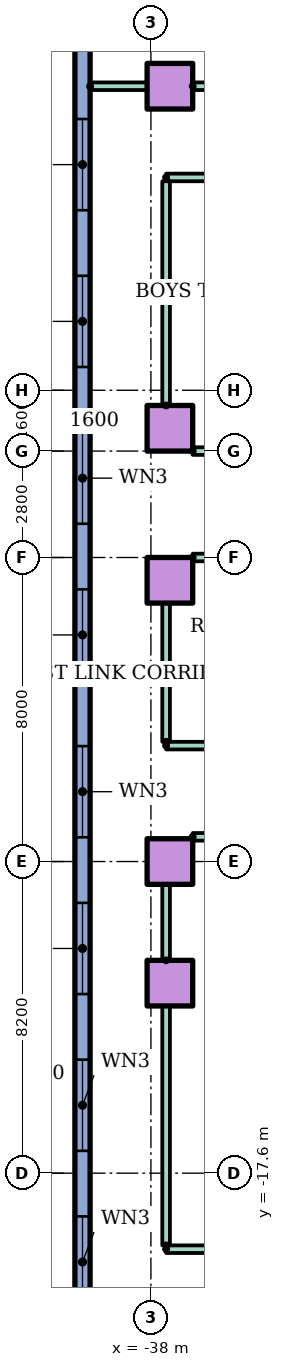
"""IFC4 building model, lengths in metres.
Left out: names, types, materials, properties, quantities, classifications, styles, units other than length and angle.
Written with IfcOpenShell. Run it as: python <this file> out.ifc"""

import sys

from ifc_helpers import new_model, si_unit, direction, frame, frame_2d, origin, origin_2d, place, context, subcontext, project, spatial, rectangle, hollow_rectangle, extrude, element, fill, save


model = new_model("IFC4")
c1 = context("Model", 3, precision=1e-05, world=origin(), true_north=direction((0.0, 1.0)))
c2 = subcontext(c1, "Body", "Model", "MODEL_VIEW")
j1 = project(units=[si_unit("LENGTHUNIT", "METRE"), si_unit("PLANEANGLEUNIT", "RADIAN")], contexts=[c1])
p1 = place(None, origin())
s1 = spatial("IfcSite", under=j1, at=p1, CompositionType="ELEMENT")
p2 = place(p1, origin())
s2 = spatial("IfcBuilding", under=s1, at=p2, CompositionType="ELEMENT")
p3 = place(p2, frame((0.0, 0.0, 10.0)))
s3 = spatial("IfcBuildingStorey", under=s2, at=p3, CompositionType="ELEMENT", Elevation=10.0)
for number, where in (
    (1, (-37.5, -12.6, 0.0)),
    (2, (-37.5, -9.4, 0.0)),
    (3, (-37.5, -2.0, 0.0)),
    (4, (-37.5, 2.0, 0.0)),
    (5, (-37.5, 11.0, 0.0)),
):
    element("IfcColumn", number, at=place(p3, frame(where)), inside=s3, PredefinedType="COLUMN", context=c2, shape_type="SweptSolid", body=[
        extrude(hollow_rectangle(XDim=1.2, YDim=1.2, WallThickness=0.06, at=origin_2d()), origin(), (0.0, 0.0, 1.0), 4.0),
    ])
p4 = place(p3, frame((-39.8, 20.0, 0.0), z_axis=(0.0, 0.0, 1.0), x_axis=(0.0, -1.0, 0.0)))
e6 = element("IfcWall", 6, at=p4, inside=s3, PredefinedType="STANDARD", context=c2, shape_type="SweptSolid", body=[
    extrude(rectangle(XDim=70.0, YDim=0.4, at=frame_2d((35.0, 0.0))), origin(), (0.0, 0.0, 1.0), 3.7),
])
p5 = place(p4, frame((1.05, 0.0, 0.9)))
e7 = element("IfcOpeningElement", 7, at=p5, cuts=e6, PredefinedType="OPENING", context=c2, shape_type="SweptSolid", body=[
    extrude(rectangle(XDim=2.4, YDim=2.1, at=frame_2d((1.2, 1.05))), frame((0.0, 0.21, 0.0), z_axis=(0.0, -1.0, 0.0), x_axis=(1.0, 0.0, 0.0)), (0.0, 0.0, 1.0), 0.42),
])
p6 = place(p4, frame((5.55, 0.0, 0.9)))
e8 = element("IfcOpeningElement", 8, at=p6, cuts=e6, PredefinedType="OPENING", context=c2, shape_type="SweptSolid", body=[
    extrude(rectangle(XDim=2.4, YDim=2.1, at=frame_2d((1.2, 1.05))), frame((0.0, 0.21, 0.0), z_axis=(0.0, -1.0, 0.0), x_axis=(1.0, 0.0, 0.0)), (0.0, 0.0, 1.0), 0.42),
])
p7 = place(p4, frame((9.863, 0.0, 0.9)))
e9 = element("IfcOpeningElement", 9, at=p7, cuts=e6, PredefinedType="OPENING", context=c2, shape_type="SweptSolid", body=[
    extrude(rectangle(XDim=2.4, YDim=2.1, at=frame_2d((1.2, 1.05))), frame((0.0, 0.21, 0.0), z_axis=(0.0, -1.0, 0.0), x_axis=(1.0, 0.0, 0.0)), (0.0, 0.0, 1.0), 0.42),
])
p8 = place(p4, frame((13.988, 0.0, 0.9)))
e10 = element("IfcOpeningElement", 10, at=p8, cuts=e6, PredefinedType="OPENING", context=c2, shape_type="SweptSolid", body=[
    extrude(rectangle(XDim=2.4, YDim=2.1, at=frame_2d((1.2, 1.05))), frame((0.0, 0.21, 0.0), z_axis=(0.0, -1.0, 0.0), x_axis=(1.0, 0.0, 0.0)), (0.0, 0.0, 1.0), 0.42),
])
p9 = place(p4, frame((18.113, 0.0, 0.9)))
e11 = element("IfcOpeningElement", 11, at=p9, cuts=e6, PredefinedType="OPENING", context=c2, shape_type="SweptSolid", body=[
    extrude(rectangle(XDim=2.4, YDim=2.1, at=frame_2d((1.2, 1.05))), frame((0.0, 0.21, 0.0), z_axis=(0.0, -1.0, 0.0), x_axis=(1.0, 0.0, 0.0)), (0.0, 0.0, 1.0), 0.42),
])
p10 = place(p4, frame((22.238, 0.0, 0.9)))
e12 = element("IfcOpeningElement", 12, at=p10, cuts=e6, PredefinedType="OPENING", context=c2, shape_type="SweptSolid", body=[
    extrude(rectangle(XDim=2.4, YDim=2.1, at=frame_2d((1.2, 1.05))), frame((0.0, 0.21, 0.0), z_axis=(0.0, -1.0, 0.0), x_axis=(1.0, 0.0, 0.0)), (0.0, 0.0, 1.0), 0.42),
])
p11 = place(p4, frame((26.363, 0.0, 0.9)))
e13 = element("IfcOpeningElement", 13, at=p11, cuts=e6, PredefinedType="OPENING", context=c2, shape_type="SweptSolid", body=[
    extrude(rectangle(XDim=2.4, YDim=2.1, at=frame_2d((1.2, 1.05))), frame((0.0, 0.21, 0.0), z_axis=(0.0, -1.0, 0.0), x_axis=(1.0, 0.0, 0.0)), (0.0, 0.0, 1.0), 0.42),
])
p12 = place(p4, frame((30.488, 0.0, 0.9)))
e14 = element("IfcOpeningElement", 14, at=p12, cuts=e6, PredefinedType="OPENING", context=c2, shape_type="SweptSolid", body=[
    extrude(rectangle(XDim=2.4, YDim=2.1, at=frame_2d((1.2, 1.05))), frame((0.0, 0.21, 0.0), z_axis=(0.0, -1.0, 0.0), x_axis=(1.0, 0.0, 0.0)), (0.0, 0.0, 1.0), 0.42),
])
p13 = place(p4, frame((34.613, 0.0, 0.9)))
e15 = element("IfcOpeningElement", 15, at=p13, cuts=e6, PredefinedType="OPENING", context=c2, shape_type="SweptSolid", body=[
    extrude(rectangle(XDim=2.4, YDim=2.1, at=frame_2d((1.2, 1.05))), frame((0.0, 0.21, 0.0), z_axis=(0.0, -1.0, 0.0), x_axis=(1.0, 0.0, 0.0)), (0.0, 0.0, 1.0), 0.42),
])
p14 = place(p4, frame((38.738, 0.0, 0.9)))
e16 = element("IfcOpeningElement", 16, at=p14, cuts=e6, PredefinedType="OPENING", context=c2, shape_type="SweptSolid", body=[
    extrude(rectangle(XDim=2.4, YDim=2.1, at=frame_2d((1.2, 1.05))), frame((0.0, 0.21, 0.0), z_axis=(0.0, -1.0, 0.0), x_axis=(1.0, 0.0, 0.0)), (0.0, 0.0, 1.0), 0.42),
])
p15 = place(p4, frame((42.633, 0.0, 0.9)))
e17 = element("IfcOpeningElement", 17, at=p15, cuts=e6, PredefinedType="OPENING", context=c2, shape_type="SweptSolid", body=[
    extrude(rectangle(XDim=2.4, YDim=2.1, at=frame_2d((1.2, 1.05))), frame((0.0, 0.21, 0.0), z_axis=(0.0, -1.0, 0.0), x_axis=(1.0, 0.0, 0.0)), (0.0, 0.0, 1.0), 0.42),
])
p16 = place(p4, frame((46.3, 0.0, 0.9)))
e18 = element("IfcOpeningElement", 18, at=p16, cuts=e6, PredefinedType="OPENING", context=c2, shape_type="SweptSolid", body=[
    extrude(rectangle(XDim=2.4, YDim=2.1, at=frame_2d((1.2, 1.05))), frame((0.0, 0.21, 0.0), z_axis=(0.0, -1.0, 0.0), x_axis=(1.0, 0.0, 0.0)), (0.0, 0.0, 1.0), 0.42),
])
p17 = place(p4, frame((49.967, 0.0, 0.9)))
e19 = element("IfcOpeningElement", 19, at=p17, cuts=e6, PredefinedType="OPENING", context=c2, shape_type="SweptSolid", body=[
    extrude(rectangle(XDim=2.4, YDim=2.1, at=frame_2d((1.2, 1.05))), frame((0.0, 0.21, 0.0), z_axis=(0.0, -1.0, 0.0), x_axis=(1.0, 0.0, 0.0)), (0.0, 0.0, 1.0), 0.42),
])
p18 = place(p4, frame((66.85, 0.0, 0.9)))
e20 = element("IfcOpeningElement", 20, at=p18, cuts=e6, PredefinedType="OPENING", context=c2, shape_type="SweptSolid", body=[
    extrude(rectangle(XDim=2.4, YDim=2.1, at=frame_2d((1.2, 1.05))), frame((0.0, 0.21, 0.0), z_axis=(0.0, -1.0, 0.0), x_axis=(1.0, 0.0, 0.0)), (0.0, 0.0, 1.0), 0.42),
])
p19 = place(p3, frame((-37.6, -19.6, 0.0)))
e21 = element("IfcWall", 21, at=p19, inside=s3, PredefinedType="PARTITIONING", context=c2, shape_type="SweptSolid", body=[
    extrude(rectangle(XDim=75.2, YDim=0.2, at=frame_2d((37.6, 0.0))), origin(), (0.0, 0.0, 1.0), 3.7),
])
p20 = place(p19, frame((2.97, 0.0, 0.0)))
e22 = element("IfcOpeningElement", 22, at=p20, cuts=e21, PredefinedType="OPENING", context=c2, shape_type="SweptSolid", body=[
    extrude(rectangle(XDim=1.1, YDim=2.1, at=frame_2d((0.55, 1.05))), frame((0.0, 0.11, 0.0), z_axis=(0.0, -1.0, 0.0), x_axis=(1.0, 0.0, 0.0)), (0.0, 0.0, 1.0), 0.22),
])
p21 = place(p19, frame((11.93, 0.0, 0.0)))
e23 = element("IfcOpeningElement", 23, at=p21, cuts=e21, PredefinedType="OPENING", context=c2, shape_type="SweptSolid", body=[
    extrude(rectangle(XDim=1.1, YDim=2.1, at=frame_2d((0.55, 1.05))), frame((0.0, 0.11, 0.0), z_axis=(0.0, -1.0, 0.0), x_axis=(1.0, 0.0, 0.0)), (0.0, 0.0, 1.0), 0.22),
])
p22 = place(p19, frame((21.5, 0.0, 0.0)))
e24 = element("IfcOpeningElement", 24, at=p22, cuts=e21, PredefinedType="OPENING", context=c2, shape_type="SweptSolid", body=[
    extrude(rectangle(XDim=1.0, YDim=2.1, at=frame_2d((0.5, 1.05))), frame((0.0, 0.11, 0.0), z_axis=(0.0, -1.0, 0.0), x_axis=(1.0, 0.0, 0.0)), (0.0, 0.0, 1.0), 0.22),
])
p23 = place(p19, frame((32.5, 0.0, 0.0)))
e25 = element("IfcOpeningElement", 25, at=p23, cuts=e21, PredefinedType="OPENING", context=c2, shape_type="SweptSolid", body=[
    extrude(rectangle(XDim=1.0, YDim=2.1, at=frame_2d((0.5, 1.05))), frame((0.0, 0.11, 0.0), z_axis=(0.0, -1.0, 0.0), x_axis=(1.0, 0.0, 0.0)), (0.0, 0.0, 1.0), 0.22),
])
p24 = place(p19, frame((41.5, 0.0, 0.0)))
e26 = element("IfcOpeningElement", 26, at=p24, cuts=e21, PredefinedType="OPENING", context=c2, shape_type="SweptSolid", body=[
    extrude(rectangle(XDim=1.0, YDim=2.1, at=frame_2d((0.5, 1.05))), frame((0.0, 0.11, 0.0), z_axis=(0.0, -1.0, 0.0), x_axis=(1.0, 0.0, 0.0)), (0.0, 0.0, 1.0), 0.22),
])
p25 = place(p19, frame((50.5, 0.0, 0.0)))
e27 = element("IfcOpeningElement", 27, at=p25, cuts=e21, PredefinedType="OPENING", context=c2, shape_type="SweptSolid", body=[
    extrude(rectangle(XDim=1.0, YDim=2.1, at=frame_2d((0.5, 1.05))), frame((0.0, 0.11, 0.0), z_axis=(0.0, -1.0, 0.0), x_axis=(1.0, 0.0, 0.0)), (0.0, 0.0, 1.0), 0.22),
])
p26 = place(p19, frame((59.724, 0.0, 0.0)))
e28 = element("IfcOpeningElement", 28, at=p26, cuts=e21, PredefinedType="OPENING", context=c2, shape_type="SweptSolid", body=[
    extrude(rectangle(XDim=1.0, YDim=2.1, at=frame_2d((0.5, 1.05))), frame((0.0, 0.11, 0.0), z_axis=(0.0, -1.0, 0.0), x_axis=(1.0, 0.0, 0.0)), (0.0, 0.0, 1.0), 0.22),
])
p27 = place(p19, frame((70.476, 0.0, 0.0)))
e29 = element("IfcOpeningElement", 29, at=p27, cuts=e21, PredefinedType="OPENING", context=c2, shape_type="SweptSolid", body=[
    extrude(rectangle(XDim=1.0, YDim=2.1, at=frame_2d((0.5, 1.05))), frame((0.0, 0.11, 0.0), z_axis=(0.0, -1.0, 0.0), x_axis=(1.0, 0.0, 0.0)), (0.0, 0.0, 1.0), 0.22),
])
p28 = place(p3, frame((-36.9, -8.75, 0.0)))
e30 = element("IfcWall", 30, at=p28, inside=s3, PredefinedType="PARTITIONING", context=c2, shape_type="SweptSolid", body=[
    extrude(rectangle(XDim=73.8, YDim=0.2, at=frame_2d((36.9, 0.0))), origin(), (0.0, 0.0, 1.0), 3.7),
])
p29 = place(p3, frame((-37.6, -6.35, 0.0)))
e31 = element("IfcWall", 31, at=p29, inside=s3, PredefinedType="PARTITIONING", context=c2, shape_type="SweptSolid", body=[
    extrude(rectangle(XDim=75.2, YDim=0.2, at=frame_2d((37.6, 0.0))), origin(), (0.0, 0.0, 1.0), 3.7),
])
p30 = place(p29, frame((6.5, 0.0, 0.0)))
e32 = element("IfcOpeningElement", 32, at=p30, cuts=e31, PredefinedType="OPENING", context=c2, shape_type="SweptSolid", body=[
    extrude(rectangle(XDim=1.0, YDim=2.1, at=frame_2d((0.5, 1.05))), frame((0.0, 0.11, 0.0), z_axis=(0.0, -1.0, 0.0), x_axis=(1.0, 0.0, 0.0)), (0.0, 0.0, 1.0), 0.22),
])
p31 = place(p29, frame((18.55, 0.0, 0.0)))
e33 = element("IfcOpeningElement", 33, at=p31, cuts=e31, PredefinedType="OPENING", context=c2, shape_type="SweptSolid", body=[
    extrude(rectangle(XDim=0.9, YDim=2.1, at=frame_2d((0.45, 1.05))), frame((0.0, 0.11, 0.0), z_axis=(0.0, -1.0, 0.0), x_axis=(1.0, 0.0, 0.0)), (0.0, 0.0, 1.0), 0.22),
])
p32 = place(p29, frame((27.55, 0.0, 0.0)))
e34 = element("IfcOpeningElement", 34, at=p32, cuts=e31, PredefinedType="OPENING", context=c2, shape_type="SweptSolid", body=[
    extrude(rectangle(XDim=0.9, YDim=2.1, at=frame_2d((0.45, 1.05))), frame((0.0, 0.11, 0.0), z_axis=(0.0, -1.0, 0.0), x_axis=(1.0, 0.0, 0.0)), (0.0, 0.0, 1.0), 0.22),
])
p33 = place(p29, frame((36.55, 0.0, 0.0)))
e35 = element("IfcOpeningElement", 35, at=p33, cuts=e31, PredefinedType="OPENING", context=c2, shape_type="SweptSolid", body=[
    extrude(rectangle(XDim=0.9, YDim=2.1, at=frame_2d((0.45, 1.05))), frame((0.0, 0.11, 0.0), z_axis=(0.0, -1.0, 0.0), x_axis=(1.0, 0.0, 0.0)), (0.0, 0.0, 1.0), 0.22),
])
p34 = place(p29, frame((48.5, 0.0, 0.0)))
e36 = element("IfcOpeningElement", 36, at=p34, cuts=e31, PredefinedType="OPENING", context=c2, shape_type="SweptSolid", body=[
    extrude(rectangle(XDim=1.0, YDim=2.1, at=frame_2d((0.5, 1.05))), frame((0.0, 0.11, 0.0), z_axis=(0.0, -1.0, 0.0), x_axis=(1.0, 0.0, 0.0)), (0.0, 0.0, 1.0), 0.22),
])
p35 = place(p29, frame((65.15, 0.0, 0.0)))
e37 = element("IfcOpeningElement", 37, at=p35, cuts=e31, PredefinedType="OPENING", context=c2, shape_type="SweptSolid", body=[
    extrude(rectangle(XDim=0.9, YDim=2.1, at=frame_2d((0.45, 1.05))), frame((0.0, 0.11, 0.0), z_axis=(0.0, -1.0, 0.0), x_axis=(1.0, 0.0, 0.0)), (0.0, 0.0, 1.0), 0.22),
])
p36 = place(p3, frame((-36.9, -1.4, 0.0)))
e38 = element("IfcWall", 38, at=p36, inside=s3, PredefinedType="PARTITIONING", context=c2, shape_type="SweptSolid", body=[
    extrude(rectangle(XDim=22.9, YDim=0.2, at=frame_2d((11.45, 0.0))), origin(), (0.0, 0.0, 1.0), 3.7),
])
p37 = place(p3, frame((-36.9, 1.4, 0.0)))
e39 = element("IfcWall", 39, at=p37, inside=s3, PredefinedType="PARTITIONING", context=c2, shape_type="SweptSolid", body=[
    extrude(rectangle(XDim=20.6, YDim=0.2, at=frame_2d((10.3, 0.0))), origin(), (0.0, 0.0, 1.0), 3.7),
])
p38 = place(p37, frame((1.3, 0.0, 0.0)))
e40 = element("IfcOpeningElement", 40, at=p38, cuts=e39, PredefinedType="OPENING", context=c2, shape_type="SweptSolid", body=[
    extrude(rectangle(XDim=1.0, YDim=2.1, at=frame_2d((0.5, 1.05))), frame((0.0, 0.11, 0.0), z_axis=(0.0, -1.0, 0.0), x_axis=(1.0, 0.0, 0.0)), (0.0, 0.0, 1.0), 0.22),
])
p39 = place(p37, frame((5.25, 0.0, 0.0)))
e41 = element("IfcOpeningElement", 41, at=p39, cuts=e39, PredefinedType="OPENING", context=c2, shape_type="SweptSolid", body=[
    extrude(rectangle(XDim=1.0, YDim=2.1, at=frame_2d((0.5, 1.05))), frame((0.0, 0.11, 0.0), z_axis=(0.0, -1.0, 0.0), x_axis=(1.0, 0.0, 0.0)), (0.0, 0.0, 1.0), 0.22),
])
p40 = place(p37, frame((10.0, 0.0, 0.0)))
e42 = element("IfcOpeningElement", 42, at=p40, cuts=e39, PredefinedType="OPENING", context=c2, shape_type="SweptSolid", body=[
    extrude(rectangle(XDim=1.0, YDim=2.1, at=frame_2d((0.5, 1.05))), frame((0.0, 0.11, 0.0), z_axis=(0.0, -1.0, 0.0), x_axis=(1.0, 0.0, 0.0)), (0.0, 0.0, 1.0), 0.22),
])
p41 = place(p37, frame((12.35, 0.0, 0.0)))
e43 = element("IfcOpeningElement", 43, at=p41, cuts=e39, PredefinedType="OPENING", context=c2, shape_type="SweptSolid", body=[
    extrude(rectangle(XDim=0.9, YDim=2.1, at=frame_2d((0.45, 1.05))), frame((0.0, 0.11, 0.0), z_axis=(0.0, -1.0, 0.0), x_axis=(1.0, 0.0, 0.0)), (0.0, 0.0, 1.0), 0.22),
])
p42 = place(p3, frame((-37.6, 8.6, 0.0)))
e44 = element("IfcWall", 44, at=p42, inside=s3, PredefinedType="PARTITIONING", context=c2, shape_type="SweptSolid", body=[
    extrude(rectangle(XDim=21.3, YDim=0.2, at=frame_2d((10.65, 0.0))), origin(), (0.0, 0.0, 1.0), 3.7),
])
p43 = place(p3, frame((-39.6, 11.0, 0.0)))
e45 = element("IfcWall", 45, at=p43, inside=s3, PredefinedType="PARTITIONING", context=c2, shape_type="SweptSolid", body=[
    extrude(rectangle(XDim=1.5, YDim=0.2, at=frame_2d((0.75, 0.0))), origin(), (0.0, 0.0, 1.0), 3.7),
])
p44 = place(p3, frame((-36.9, 11.0, 0.0)))
e46 = element("IfcWall", 46, at=p44, inside=s3, PredefinedType="PARTITIONING", context=c2, shape_type="SweptSolid", body=[
    extrude(rectangle(XDim=6.4, YDim=0.2, at=frame_2d((3.2, 0.0))), origin(), (0.0, 0.0, 1.0), 3.7),
])
p45 = place(p44, frame((1.132, 0.0, 0.0)))
e47 = element("IfcOpeningElement", 47, at=p45, cuts=e46, PredefinedType="OPENING", context=c2, shape_type="SweptSolid", body=[
    extrude(rectangle(XDim=1.0, YDim=2.1, at=frame_2d((0.5, 1.05))), frame((0.0, 0.11, 0.0), z_axis=(0.0, -1.0, 0.0), x_axis=(1.0, 0.0, 0.0)), (0.0, 0.0, 1.0), 0.22),
])
p46 = place(p44, frame((5.05, 0.0, 0.0)))
e48 = element("IfcOpeningElement", 48, at=p46, cuts=e46, PredefinedType="OPENING", context=c2, shape_type="SweptSolid", body=[
    extrude(rectangle(XDim=1.0, YDim=2.1, at=frame_2d((0.5, 1.05))), frame((0.0, 0.11, 0.0), z_axis=(0.0, -1.0, 0.0), x_axis=(1.0, 0.0, 0.0)), (0.0, 0.0, 1.0), 0.22),
])
p47 = place(p3, frame((-37.6, -19.5, 0.0), z_axis=(0.0, 0.0, 1.0), x_axis=(0.0, 1.0, 0.0)))
e49 = element("IfcWall", 49, at=p47, inside=s3, PredefinedType="PARTITIONING", context=c2, shape_type="SweptSolid", body=[
    extrude(rectangle(XDim=6.3, YDim=0.2, at=frame_2d((3.15, 0.0))), origin(), (0.0, 0.0, 1.0), 3.7),
])
p48 = place(p3, frame((-37.6, -12.0, 0.0), z_axis=(0.0, 0.0, 1.0), x_axis=(0.0, 1.0, 0.0)))
e50 = element("IfcWall", 50, at=p48, inside=s3, PredefinedType="PARTITIONING", context=c2, shape_type="SweptSolid", body=[
    extrude(rectangle(XDim=2.0, YDim=0.2, at=frame_2d((1.0, 0.0))), origin(), (0.0, 0.0, 1.0), 3.7),
])
p49 = place(p3, frame((-37.6, -6.25, 0.0), z_axis=(0.0, 0.0, 1.0), x_axis=(0.0, 1.0, 0.0)))
e51 = element("IfcWall", 51, at=p49, inside=s3, PredefinedType="PARTITIONING", context=c2, shape_type="SweptSolid", body=[
    extrude(rectangle(XDim=3.65, YDim=0.2, at=frame_2d((1.825, 0.0))), origin(), (0.0, 0.0, 1.0), 3.7),
])
p50 = place(p3, frame((-37.6, 2.6, 0.0), z_axis=(0.0, 0.0, 1.0), x_axis=(0.0, 1.0, 0.0)))
e52 = element("IfcWall", 52, at=p50, inside=s3, PredefinedType="PARTITIONING", context=c2, shape_type="SweptSolid", body=[
    extrude(rectangle(XDim=5.9, YDim=0.2, at=frame_2d((2.95, 0.0))), origin(), (0.0, 0.0, 1.0), 3.7),
])
p51 = place(p7, origin())
e53 = element("IfcWindow", 53, at=p51, inside=s3, PartitioningType="SINGLE_PANEL", PredefinedType="WINDOW", context=c2, shape_type="SweptSolid", body=[
    extrude(rectangle(XDim=2.4, YDim=2.1, at=frame_2d((1.2, 1.05))), frame((0.0, 0.03, 0.0), z_axis=(0.0, -1.0, 0.0), x_axis=(1.0, 0.0, 0.0)), (0.0, 0.0, 1.0), 0.06),
])
fill(e9, e53)
p52 = place(p8, origin())
e54 = element("IfcWindow", 54, at=p52, inside=s3, PartitioningType="SINGLE_PANEL", PredefinedType="WINDOW", context=c2, shape_type="SweptSolid", body=[
    extrude(rectangle(XDim=2.4, YDim=2.1, at=frame_2d((1.2, 1.05))), frame((0.0, 0.03, 0.0), z_axis=(0.0, -1.0, 0.0), x_axis=(1.0, 0.0, 0.0)), (0.0, 0.0, 1.0), 0.06),
])
fill(e10, e54)
p53 = place(p9, origin())
e55 = element("IfcWindow", 55, at=p53, inside=s3, PartitioningType="SINGLE_PANEL", PredefinedType="WINDOW", context=c2, shape_type="SweptSolid", body=[
    extrude(rectangle(XDim=2.4, YDim=2.1, at=frame_2d((1.2, 1.05))), frame((0.0, 0.03, 0.0), z_axis=(0.0, -1.0, 0.0), x_axis=(1.0, 0.0, 0.0)), (0.0, 0.0, 1.0), 0.06),
])
fill(e11, e55)
p54 = place(p10, origin())
e56 = element("IfcWindow", 56, at=p54, inside=s3, PartitioningType="SINGLE_PANEL", PredefinedType="WINDOW", context=c2, shape_type="SweptSolid", body=[
    extrude(rectangle(XDim=2.4, YDim=2.1, at=frame_2d((1.2, 1.05))), frame((0.0, 0.03, 0.0), z_axis=(0.0, -1.0, 0.0), x_axis=(1.0, 0.0, 0.0)), (0.0, 0.0, 1.0), 0.06),
])
fill(e12, e56)
p55 = place(p11, origin())
e57 = element("IfcWindow", 57, at=p55, inside=s3, PartitioningType="SINGLE_PANEL", PredefinedType="WINDOW", context=c2, shape_type="SweptSolid", body=[
    extrude(rectangle(XDim=2.4, YDim=2.1, at=frame_2d((1.2, 1.05))), frame((0.0, 0.03, 0.0), z_axis=(0.0, -1.0, 0.0), x_axis=(1.0, 0.0, 0.0)), (0.0, 0.0, 1.0), 0.06),
])
fill(e13, e57)
p56 = place(p12, origin())
e58 = element("IfcWindow", 58, at=p56, inside=s3, PartitioningType="SINGLE_PANEL", PredefinedType="WINDOW", context=c2, shape_type="SweptSolid", body=[
    extrude(rectangle(XDim=2.4, YDim=2.1, at=frame_2d((1.2, 1.05))), frame((0.0, 0.03, 0.0), z_axis=(0.0, -1.0, 0.0), x_axis=(1.0, 0.0, 0.0)), (0.0, 0.0, 1.0), 0.06),
])
fill(e14, e58)
p57 = place(p13, origin())
e59 = element("IfcWindow", 59, at=p57, inside=s3, PartitioningType="SINGLE_PANEL", PredefinedType="WINDOW", context=c2, shape_type="SweptSolid", body=[
    extrude(rectangle(XDim=2.4, YDim=2.1, at=frame_2d((1.2, 1.05))), frame((0.0, 0.03, 0.0), z_axis=(0.0, -1.0, 0.0), x_axis=(1.0, 0.0, 0.0)), (0.0, 0.0, 1.0), 0.06),
])
fill(e15, e59)
p58 = place(p14, origin())
e60 = element("IfcWindow", 60, at=p58, inside=s3, PartitioningType="SINGLE_PANEL", PredefinedType="WINDOW", context=c2, shape_type="SweptSolid", body=[
    extrude(rectangle(XDim=2.4, YDim=2.1, at=frame_2d((1.2, 1.05))), frame((0.0, 0.03, 0.0), z_axis=(0.0, -1.0, 0.0), x_axis=(1.0, 0.0, 0.0)), (0.0, 0.0, 1.0), 0.06),
])
fill(e16, e60)
save(model, sys.argv[1])
